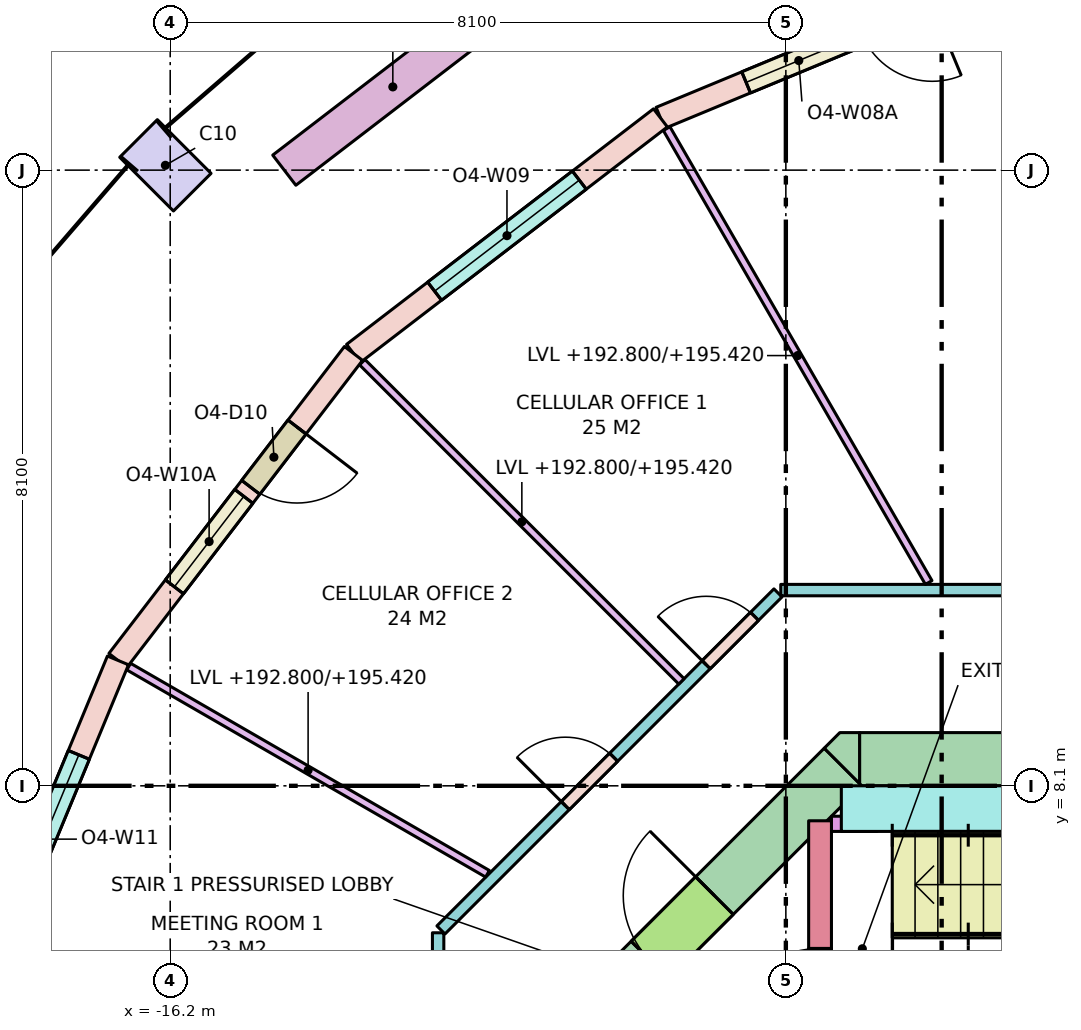
"""IFC4 building model, lengths in metres.
Left out: names, types, materials, properties, quantities, classifications, styles, units other than length and angle.
Written with IfcOpenShell. Run it as: python <this file> out.ifc"""

import sys

from ifc_helpers import new_model, si_unit, direction, frame, frame_2d, origin, origin_2d, place, context, subcontext, project, spatial, polyline, rectangle, outline, extrude, element, fill, save


model = new_model("IFC4")
c1 = context("Model", 3, precision=1e-05, world=origin(), true_north=direction((0.0, 1.0)))
c2 = subcontext(c1, "Body", "Model", "MODEL_VIEW")
j1 = project(units=[si_unit("LENGTHUNIT", "METRE"), si_unit("PLANEANGLEUNIT", "RADIAN")], contexts=[c1])
p1 = place(None, origin())
s1 = spatial("IfcSite", under=j1, at=p1, CompositionType="ELEMENT")
p2 = place(p1, origin())
s2 = spatial("IfcBuilding", under=s1, at=p2, CompositionType="ELEMENT")
p3 = place(p2, frame((0.0, 0.0, 192.8)))
s3 = spatial("IfcBuildingStorey", under=s2, at=p3, CompositionType="ELEMENT", Elevation=192.8)
p4 = place(p3, frame((-16.263, 16.263, 0.0), z_axis=(0.0, 0.0, 1.0), x_axis=(-0.707106781187, -0.707106781187, 0.0)))
e1 = element("IfcColumn", 1, at=p4, inside=s3, PredefinedType="COLUMN", context=c2, shape_type="SweptSolid", body=[
    extrude(rectangle(XDim=0.7, YDim=1.0, at=origin_2d()), origin(), (0.0, 0.0, 1.0), 3.7),
])
p5 = place(p3, frame((-7.13, 8.45, -0.28), z_axis=(0.0, 0.0, 1.0), x_axis=(1.0, 0.0, 0.0)))
e2 = element("IfcWall", 2, at=p5, inside=s3, PredefinedType="SHEAR", context=c2, shape_type="SweptSolid", body=[
    extrude(rectangle(XDim=14.26, YDim=0.7, at=frame_2d((7.13, 0.0))), origin(), (0.0, 0.0, 1.0), 3.7),
])
p6 = place(p5, frame((5.48, 0.0, 0.28)))
e3 = element("IfcOpeningElement", 3, at=p6, cuts=e2, PredefinedType="OPENING", context=c2, shape_type="SweptSolid", body=[
    extrude(rectangle(XDim=0.7, YDim=2.1, at=frame_2d((0.35, 1.05))), frame((0.0, 0.36, 0.0), z_axis=(0.0, -1.0, 0.0), x_axis=(1.0, 0.0, 0.0)), (0.0, 0.0, 1.0), 0.72),
])
p7 = place(p5, frame((7.155, 0.0, 0.28)))
e4 = element("IfcOpeningElement", 4, at=p7, cuts=e2, PredefinedType="OPENING", context=c2, shape_type="SweptSolid", body=[
    extrude(rectangle(XDim=0.9, YDim=2.1, at=frame_2d((0.45, 1.05))), frame((0.0, 0.36, 0.0), z_axis=(0.0, -1.0, 0.0), x_axis=(1.0, 0.0, 0.0)), (0.0, 0.0, 1.0), 0.72),
])
p8 = place(p3, frame((-10.347, 5.347, -0.28), z_axis=(0.0, 0.0, 1.0), x_axis=(0.707106781187, 0.707106781187, 0.0)))
e5 = element("IfcWall", 5, at=p8, inside=s3, PredefinedType="SHEAR", context=c2, shape_type="SweptSolid", body=[
    extrude(rectangle(XDim=4.243, YDim=0.7, at=frame_2d((2.121, 0.0))), origin(), (0.0, 0.0, 1.0), 3.7),
])
p9 = place(p8, frame((0.65, 0.0, 0.28)))
e6 = element("IfcOpeningElement", 6, at=p9, cuts=e5, PredefinedType="OPENING", context=c2, shape_type="SweptSolid", body=[
    extrude(rectangle(XDim=1.2, YDim=2.1, at=frame_2d((0.6, 1.05))), frame((0.0, 0.36, 0.0), z_axis=(0.0, -1.0, 0.0), x_axis=(1.0, 0.0, 0.0)), (0.0, 0.0, 1.0), 0.72),
])
p10 = place(p3, frame((0.0, 0.0, -0.28)))
e7 = element("IfcWall", 7, at=p10, inside=s3, PredefinedType="SHEAR", context=c2, shape_type="SweptSolid", body=[
    extrude(outline(polyline([(-7.39, 8.8), (-7.13, 8.8), (-7.13, 8.8), (-7.13, 8.13), (-7.595, 8.595), (-7.595, 8.595), (-7.595, 8.595), (-7.39, 8.8)])), origin(), (0.0, 0.0, 1.0), 3.7),
])
p11 = place(p3, frame((-7.65, 4.5, 0.0), z_axis=(0.0, 0.0, 1.0), x_axis=(0.0, 1.0, 0.0)))
e8 = element("IfcWall", 8, at=p11, inside=s3, PredefinedType="SHEAR", context=c2, shape_type="SweptSolid", body=[
    extrude(rectangle(XDim=3.14, YDim=0.3, at=frame_2d((1.57, 0.0))), origin(), (0.0, 0.0, 1.0), 3.42),
])
p12 = place(p11, frame((0.14, 0.0, 0.0)))
e9 = element("IfcOpeningElement", 9, at=p12, cuts=e8, PredefinedType="OPENING", context=c2, shape_type="SweptSolid", body=[
    extrude(rectangle(XDim=1.32, YDim=2.1, at=frame_2d((0.66, 1.05))), frame((0.0, 0.16, 0.0), z_axis=(0.0, -1.0, 0.0), x_axis=(1.0, 0.0, 0.0)), (0.0, 0.0, 1.0), 0.32),
])
p13 = place(p3, frame((-7.37, 7.8, 0.0), z_axis=(0.0, 0.0, 1.0), x_axis=(1.0, 0.0, 0.0)))
e10 = element("IfcWall", 10, at=p13, inside=s3, PredefinedType="SHEAR", context=c2, shape_type="SweptSolid", body=[
    extrude(rectangle(XDim=5.37, YDim=0.6, at=frame_2d((2.685, 0.0))), origin(), (0.0, 0.0, 1.0), 3.42),
])
p14 = place(p3, frame((-7.5, 7.6, 0.0), z_axis=(0.0, 0.0, 1.0), x_axis=(1.0, 0.0, 0.0)))
e11 = element("IfcWall", 11, at=p14, inside=s3, PredefinedType="SHEAR", context=c2, shape_type="SweptSolid", body=[
    extrude(rectangle(XDim=0.6, YDim=0.2, at=frame_2d((0.3, 0.0))), origin(), (0.0, 0.0, 1.0), 3.42),
])
p15 = place(p3, frame((-5.047, 18.836, 0.0), z_axis=(0.0, 0.0, 1.0), x_axis=(-0.923862504675, -0.382724538613, 0.0)))
e12 = element("IfcWall", 12, at=p15, inside=s3, PredefinedType="STANDARD", context=c2, shape_type="SweptSolid", body=[
    extrude(rectangle(XDim=5.091, YDim=0.3, at=frame_2d((2.545, 0.0))), origin(), (0.0, 0.0, 1.0), 3.42),
])
p16 = place(p15, frame((1.22, 0.0, 0.0)))
e13 = element("IfcOpeningElement", 13, at=p16, cuts=e12, PredefinedType="OPENING", context=c2, shape_type="SweptSolid", body=[
    extrude(rectangle(XDim=1.0, YDim=2.4, at=frame_2d((0.5, 1.2))), frame((0.0, 0.16, 0.0), z_axis=(0.0, -1.0, 0.0), x_axis=(1.0, 0.0, 0.0)), (0.0, 0.0, 1.0), 0.32),
])
p17 = place(p15, frame((2.37, 0.0, 0.8)))
e14 = element("IfcOpeningElement", 14, at=p17, cuts=e12, PredefinedType="OPENING", context=c2, shape_type="SweptSolid", body=[
    extrude(rectangle(XDim=1.5, YDim=2.4, at=frame_2d((0.75, 1.2))), frame((0.0, 0.16, 0.0), z_axis=(0.0, -1.0, 0.0), x_axis=(1.0, 0.0, 0.0)), (0.0, 0.0, 1.0), 0.32),
])
p18 = place(p3, frame((-9.75, 16.887, 0.0), z_axis=(0.0, 0.0, 1.0), x_axis=(-0.79335619014, -0.608757714995, 0.0)))
e15 = element("IfcWall", 15, at=p18, inside=s3, PredefinedType="STANDARD", context=c2, shape_type="SweptSolid", body=[
    extrude(rectangle(XDim=5.091, YDim=0.3, at=frame_2d((2.545, 0.0))), origin(), (0.0, 0.0, 1.0), 3.42),
])
p19 = place(p18, frame((1.345, 0.0, 0.8)))
e16 = element("IfcOpeningElement", 16, at=p19, cuts=e15, PredefinedType="OPENING", context=c2, shape_type="SweptSolid", body=[
    extrude(rectangle(XDim=2.4, YDim=2.4, at=frame_2d((1.2, 1.2))), frame((0.0, 0.16, 0.0), z_axis=(0.0, -1.0, 0.0), x_axis=(1.0, 0.0, 0.0)), (0.0, 0.0, 1.0), 0.32),
])
p20 = place(p3, frame((-13.789, 13.789, 0.0), z_axis=(0.0, 0.0, 1.0), x_axis=(-0.608757714995, -0.79335619014, 0.0)))
e17 = element("IfcWall", 17, at=p20, inside=s3, PredefinedType="STANDARD", context=c2, shape_type="SweptSolid", body=[
    extrude(rectangle(XDim=5.091, YDim=0.3, at=frame_2d((2.545, 0.0))), origin(), (0.0, 0.0, 1.0), 3.42),
])
p21 = place(p20, frame((1.22, 0.0, 0.0)))
e18 = element("IfcOpeningElement", 18, at=p21, cuts=e17, PredefinedType="OPENING", context=c2, shape_type="SweptSolid", body=[
    extrude(rectangle(XDim=1.0, YDim=2.4, at=frame_2d((0.5, 1.2))), frame((0.0, 0.16, 0.0), z_axis=(0.0, -1.0, 0.0), x_axis=(1.0, 0.0, 0.0)), (0.0, 0.0, 1.0), 0.32),
])
p22 = place(p20, frame((2.37, 0.0, 0.8)))
e19 = element("IfcOpeningElement", 19, at=p22, cuts=e17, PredefinedType="OPENING", context=c2, shape_type="SweptSolid", body=[
    extrude(rectangle(XDim=1.5, YDim=2.4, at=frame_2d((0.75, 1.2))), frame((0.0, 0.16, 0.0), z_axis=(0.0, -1.0, 0.0), x_axis=(1.0, 0.0, 0.0)), (0.0, 0.0, 1.0), 0.32),
])
p23 = place(p3, frame((-16.887, 9.75, 0.0), z_axis=(0.0, 0.0, 1.0), x_axis=(-0.382724538613, -0.923862504675, 0.0)))
e20 = element("IfcWall", 20, at=p23, inside=s3, PredefinedType="STANDARD", context=c2, shape_type="SweptSolid", body=[
    extrude(rectangle(XDim=5.091, YDim=0.3, at=frame_2d((2.545, 0.0))), origin(), (0.0, 0.0, 1.0), 3.42),
])
p24 = place(p23, frame((1.345, 0.0, 0.8)))
e21 = element("IfcOpeningElement", 21, at=p24, cuts=e20, PredefinedType="OPENING", context=c2, shape_type="SweptSolid", body=[
    extrude(rectangle(XDim=2.4, YDim=2.4, at=frame_2d((1.2, 1.2))), frame((0.0, 0.16, 0.0), z_axis=(0.0, -1.0, 0.0), x_axis=(1.0, 0.0, 0.0)), (0.0, 0.0, 1.0), 0.32),
])
p25 = place(p3, frame((-11.843, 18.391, 0.0), z_axis=(0.0, 0.0, 1.0), x_axis=(-0.793326845617, -0.608795955984, 0.0)))
e22 = element("IfcWall", 22, at=p25, inside=s3, PredefinedType="PARAPET", context=c2, shape_type="SweptSolid", body=[
    extrude(rectangle(XDim=3.6, YDim=0.5, at=frame_2d((1.8, 0.0))), origin(), (0.0, 0.0, 1.0), 0.9),
])
p26 = place(p3, frame((-12.675, -6.167, 0.0), z_axis=(0.0, 0.0, 1.0), x_axis=(0.0, 1.0, 0.0)))
e23 = element("IfcWall", 23, at=p26, inside=s3, PredefinedType="PARTITIONING", context=c2, shape_type="SweptSolid", body=[
    extrude(rectangle(XDim=12.333, YDim=0.15, at=frame_2d((6.167, 0.0))), origin(), (0.0, 0.0, 1.0), 2.62),
])
p27 = place(p26, frame((10.473, 0.0, 0.0)))
e24 = element("IfcOpeningElement", 24, at=p27, cuts=e23, PredefinedType="OPENING", context=c2, shape_type="SweptSolid", body=[
    extrude(rectangle(XDim=0.9, YDim=2.1, at=frame_2d((0.45, 1.05))), frame((0.0, 0.085, 0.0), z_axis=(0.0, -1.0, 0.0), x_axis=(1.0, 0.0, 0.0)), (0.0, 0.0, 1.0), 0.17),
])
p28 = place(p26, frame((7.416, 0.0, 0.0)))
e25 = element("IfcOpeningElement", 25, at=p28, cuts=e23, PredefinedType="OPENING", context=c2, shape_type="SweptSolid", body=[
    extrude(rectangle(XDim=0.9, YDim=2.1, at=frame_2d((0.45, 1.05))), frame((0.0, 0.085, 0.0), z_axis=(0.0, -1.0, 0.0), x_axis=(1.0, 0.0, 0.0)), (0.0, 0.0, 1.0), 0.17),
])
p29 = place(p26, frame((4.018, 0.0, 0.0)))
e26 = element("IfcOpeningElement", 26, at=p29, cuts=e23, PredefinedType="OPENING", context=c2, shape_type="SweptSolid", body=[
    extrude(rectangle(XDim=0.9, YDim=2.1, at=frame_2d((0.45, 1.05))), frame((0.0, 0.085, 0.0), z_axis=(0.0, -1.0, 0.0), x_axis=(1.0, 0.0, 0.0)), (0.0, 0.0, 1.0), 0.17),
])
p30 = place(p26, frame((0.96, 0.0, 0.0)))
e27 = element("IfcOpeningElement", 27, at=p30, cuts=e23, PredefinedType="OPENING", context=c2, shape_type="SweptSolid", body=[
    extrude(rectangle(XDim=0.9, YDim=2.1, at=frame_2d((0.45, 1.05))), frame((0.0, 0.085, 0.0), z_axis=(0.0, -1.0, 0.0), x_axis=(1.0, 0.0, 0.0)), (0.0, 0.0, 1.0), 0.17),
])
p31 = place(p3, frame((-12.638, 6.204, 0.0), z_axis=(0.0, 0.0, 1.0), x_axis=(0.707106781187, 0.707106781187, 0.0)))
e28 = element("IfcWall", 28, at=p31, inside=s3, PredefinedType="PARTITIONING", context=c2, shape_type="SweptSolid", body=[
    extrude(rectangle(XDim=6.271, YDim=0.15, at=frame_2d((3.135, 0.0))), origin(), (0.0, 0.0, 1.0), 2.62),
])
p32 = place(p31, frame((4.935, 0.0, 0.0)))
e29 = element("IfcOpeningElement", 29, at=p32, cuts=e28, PredefinedType="OPENING", context=c2, shape_type="SweptSolid", body=[
    extrude(rectangle(XDim=0.9, YDim=2.1, at=frame_2d((0.45, 1.05))), frame((0.0, 0.085, 0.0), z_axis=(0.0, -1.0, 0.0), x_axis=(1.0, 0.0, 0.0)), (0.0, 0.0, 1.0), 0.17),
])
p33 = place(p31, frame((2.314, 0.0, 0.0)))
e30 = element("IfcOpeningElement", 30, at=p33, cuts=e28, PredefinedType="OPENING", context=c2, shape_type="SweptSolid", body=[
    extrude(rectangle(XDim=0.9, YDim=2.1, at=frame_2d((0.45, 1.05))), frame((0.0, 0.085, 0.0), z_axis=(0.0, -1.0, 0.0), x_axis=(1.0, 0.0, 0.0)), (0.0, 0.0, 1.0), 0.17),
])
p34 = place(p3, frame((-8.167, 10.675, 0.0), z_axis=(0.0, 0.0, 1.0), x_axis=(1.0, 0.0, 0.0)))
e31 = element("IfcWall", 31, at=p34, inside=s3, PredefinedType="PARTITIONING", context=c2, shape_type="SweptSolid", body=[
    extrude(rectangle(XDim=16.333, YDim=0.15, at=frame_2d((8.167, 0.0))), origin(), (0.0, 0.0, 1.0), 2.62),
])
p35 = place(p34, frame((8.24, 0.0, 0.0)))
e32 = element("IfcOpeningElement", 32, at=p35, cuts=e31, PredefinedType="OPENING", context=c2, shape_type="SweptSolid", body=[
    extrude(rectangle(XDim=1.8, YDim=2.1, at=frame_2d((0.9, 1.05))), frame((0.0, 0.085, 0.0), z_axis=(0.0, -1.0, 0.0), x_axis=(1.0, 0.0, 0.0)), (0.0, 0.0, 1.0), 0.17),
])
p36 = place(p3, frame((-6.221, 10.775, 0.0), z_axis=(0.0, 0.0, 1.0), x_axis=(-0.500015661236, 0.866016361577, 0.0)))
e33 = element("IfcWall", 33, at=p36, inside=s3, PredefinedType="PARTITIONING", context=c2, shape_type="SweptSolid", body=[
    extrude(rectangle(XDim=6.895, YDim=0.1, at=frame_2d((3.448, 0.0))), origin(), (0.0, 0.0, 1.0), 2.62),
])
p37 = place(p3, frame((-9.474, 9.474, 0.0), z_axis=(0.0, 0.0, 1.0), x_axis=(-0.707106781187, 0.707106781187, 0.0)))
e34 = element("IfcWall", 34, at=p37, inside=s3, PredefinedType="PARTITIONING", context=c2, shape_type="SweptSolid", body=[
    extrude(rectangle(XDim=5.938, YDim=0.1, at=frame_2d((2.969, 0.0))), origin(), (0.0, 0.0, 1.0), 2.62),
])
p38 = place(p3, frame((-12.025, 6.943, 0.0), z_axis=(0.0, 0.0, 1.0), x_axis=(-0.866029712004, 0.499992537871, 0.0)))
e35 = element("IfcWall", 35, at=p38, inside=s3, PredefinedType="PARTITIONING", context=c2, shape_type="SweptSolid", body=[
    extrude(rectangle(XDim=5.451, YDim=0.1, at=frame_2d((2.726, 0.0))), origin(), (0.0, 0.0, 1.0), 2.62),
])
p39 = place(p17, origin())
e36 = element("IfcWindow", 36, at=p39, inside=s3, PartitioningType="SINGLE_PANEL", PredefinedType="WINDOW", context=c2, shape_type="SweptSolid", body=[
    extrude(rectangle(XDim=1.5, YDim=2.4, at=frame_2d((0.75, 1.2))), frame((0.0, 0.03, 0.0), z_axis=(0.0, -1.0, 0.0), x_axis=(1.0, 0.0, 0.0)), (0.0, 0.0, 1.0), 0.06),
])
fill(e14, e36)
p40 = place(p19, origin())
e37 = element("IfcWindow", 37, at=p40, inside=s3, PartitioningType="SINGLE_PANEL", PredefinedType="WINDOW", context=c2, shape_type="SweptSolid", body=[
    extrude(rectangle(XDim=2.4, YDim=2.4, at=frame_2d((1.2, 1.2))), frame((0.0, 0.03, 0.0), z_axis=(0.0, -1.0, 0.0), x_axis=(1.0, 0.0, 0.0)), (0.0, 0.0, 1.0), 0.06),
])
fill(e16, e37)
p41 = place(p21, origin())
e38 = element("IfcDoor", 38, at=p41, inside=s3, OperationType="SINGLE_SWING_LEFT", PredefinedType="DOOR", context=c2, shape_type="SweptSolid", body=[
    extrude(rectangle(XDim=1.0, YDim=2.4, at=frame_2d((0.5, 1.2))), frame((0.0, 0.025, 0.0), z_axis=(0.0, -1.0, 0.0), x_axis=(1.0, 0.0, 0.0)), (0.0, 0.0, 1.0), 0.05),
])
fill(e18, e38)
p42 = place(p22, origin())
e39 = element("IfcWindow", 39, at=p42, inside=s3, PartitioningType="SINGLE_PANEL", PredefinedType="WINDOW", context=c2, shape_type="SweptSolid", body=[
    extrude(rectangle(XDim=1.5, YDim=2.4, at=frame_2d((0.75, 1.2))), frame((0.0, 0.03, 0.0), z_axis=(0.0, -1.0, 0.0), x_axis=(1.0, 0.0, 0.0)), (0.0, 0.0, 1.0), 0.06),
])
fill(e19, e39)
p43 = place(p24, origin())
e40 = element("IfcWindow", 40, at=p43, inside=s3, PartitioningType="SINGLE_PANEL", PredefinedType="WINDOW", context=c2, shape_type="SweptSolid", body=[
    extrude(rectangle(XDim=2.4, YDim=2.4, at=frame_2d((1.2, 1.2))), frame((0.0, 0.03, 0.0), z_axis=(0.0, -1.0, 0.0), x_axis=(1.0, 0.0, 0.0)), (0.0, 0.0, 1.0), 0.06),
])
fill(e21, e40)
p44 = place(p12, origin())
e41 = element("IfcDoor", 41, at=p44, inside=s3, OperationType="DOUBLE_DOOR_SINGLE_SWING", PredefinedType="DOOR", context=c2, shape_type="SweptSolid", body=[
    extrude(rectangle(XDim=1.32, YDim=2.1, at=frame_2d((0.66, 1.05))), frame((0.0, 0.025, 0.0), z_axis=(0.0, -1.0, 0.0), x_axis=(1.0, 0.0, 0.0)), (0.0, 0.0, 1.0), 0.05),
])
fill(e9, e41)
p45 = place(p9, origin())
e42 = element("IfcDoor", 42, at=p45, inside=s3, OperationType="SINGLE_SWING_RIGHT", PredefinedType="DOOR", context=c2, shape_type="SweptSolid", body=[
    extrude(rectangle(XDim=1.2, YDim=2.1, at=frame_2d((0.6, 1.05))), frame((0.0, 0.025, 0.0), z_axis=(0.0, -1.0, 0.0), x_axis=(1.0, 0.0, 0.0)), (0.0, 0.0, 1.0), 0.05),
])
fill(e6, e42)
p46 = place(p32, origin())
e43 = element("IfcDoor", 43, at=p46, inside=s3, OperationType="SINGLE_SWING_LEFT", PredefinedType="DOOR", context=c2, shape_type="SweptSolid", body=[
    extrude(rectangle(XDim=0.9, YDim=2.1, at=frame_2d((0.45, 1.05))), frame((0.0, 0.025, 0.0), z_axis=(0.0, -1.0, 0.0), x_axis=(1.0, 0.0, 0.0)), (0.0, 0.0, 1.0), 0.05),
])
fill(e29, e43)
p47 = place(p33, origin())
e44 = element("IfcDoor", 44, at=p47, inside=s3, OperationType="SINGLE_SWING_LEFT", PredefinedType="DOOR", context=c2, shape_type="SweptSolid", body=[
    extrude(rectangle(XDim=0.9, YDim=2.1, at=frame_2d((0.45, 1.05))), frame((0.0, 0.025, 0.0), z_axis=(0.0, -1.0, 0.0), x_axis=(1.0, 0.0, 0.0)), (0.0, 0.0, 1.0), 0.05),
])
fill(e30, e44)
save(model, sys.argv[1])
